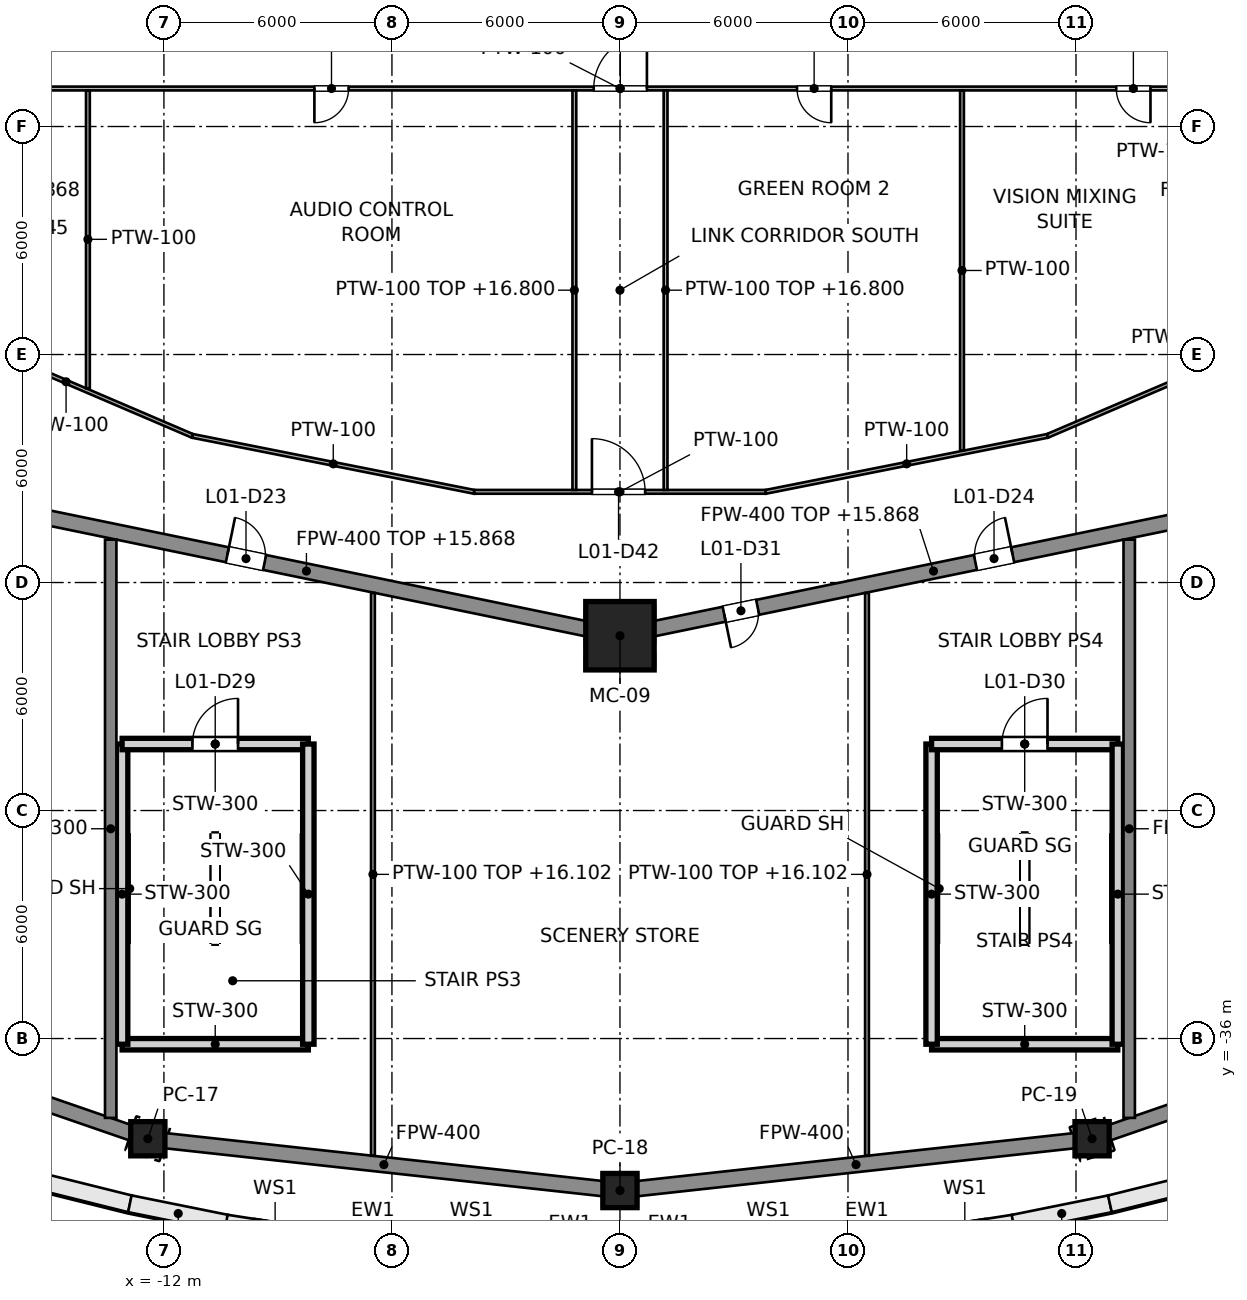
"""IFC4 building model, lengths in metres.
Left out: names, types, materials, properties, quantities, classifications, styles, units other than length and angle.
Written with IfcOpenShell. Run it as: python <this file> out.ifc"""

import sys

from ifc_helpers import new_model, si_unit, direction, frame, frame_2d, origin, origin_2d, place, context, subcontext, project, spatial, polyline, rectangle, hollow_rectangle, outline, extrude, element, fill, save


model = new_model("IFC4")
c1 = context("Model", 3, precision=1e-05, world=origin(), true_north=direction((0.0, 1.0)))
c2 = subcontext(c1, "Body", "Model", "MODEL_VIEW")
j1 = project(units=[si_unit("LENGTHUNIT", "METRE"), si_unit("PLANEANGLEUNIT", "RADIAN")], contexts=[c1])
p1 = place(None, origin())
s1 = spatial("IfcSite", under=j1, at=p1, CompositionType="ELEMENT")
p2 = place(p1, origin())
s2 = spatial("IfcBuilding", under=s1, at=p2, CompositionType="ELEMENT")
p3 = place(p2, frame((0.0, 0.0, 8.0)))
s3 = spatial("IfcBuildingStorey", under=s2, at=p3, CompositionType="ELEMENT", Elevation=8.0)
p4 = place(p3, frame((0.0, -25.4, 0.0), z_axis=(0.0, 0.0, 1.0), x_axis=(0.0, -1.0, 0.0)))
e1 = element("IfcColumn", 1, at=p4, inside=s3, PredefinedType="COLUMN", context=c2, shape_type="SweptSolid", body=[
    extrude(hollow_rectangle(XDim=1.8, YDim=1.8, WallThickness=0.08, at=origin_2d()), origin(), (0.0, 0.0, 1.0), 9.0),
])
for number, where, z_axis, x_axis in (
    (2, (-12.423, -38.637, 0.0), (0.0, 0.0, 1.0), (-0.306, -0.952, 0.0)),
    (3, (0.0, -40.0, 0.0), (0.0, 0.0, 1.0), (0.0, -1.0, 0.0)),
    (4, (12.423, -38.637, 0.0), (0.0, 0.0, 1.0), (0.306, -0.952, 0.0)),
):
    element("IfcColumn", number, at=place(p3, frame(where, z_axis=z_axis, x_axis=x_axis)), inside=s3, PredefinedType="COLUMN", context=c2, shape_type="SweptSolid", body=[
        extrude(hollow_rectangle(XDim=0.9, YDim=0.9, WallThickness=0.04, at=origin_2d()), origin(), (0.0, 0.0, 1.0), 9.0),
    ])
p5 = place(p3, origin())
e5 = element("IfcWall", 5, at=p5, inside=s3, PredefinedType="SOLIDWALL", context=c2, shape_type="SweptSolid", body=[
    extrude(outline(polyline([(-25.0, -36.373), (-22.699, -37.422), (-20.337, -38.369), (-17.918, -39.21), (-15.451, -39.944), (-12.941, -40.569), (-12.842, -40.13), (-15.332, -39.51), (-17.78, -38.782), (-20.179, -37.948), (-22.522, -37.009), (-24.804, -35.968), (-25.0, -36.373)])), origin(), (0.0, 0.0, 1.0), 8.8),
])
p6 = place(p3, frame((-12.896, -40.348, 0.0), z_axis=(0.0, 0.0, 1.0), x_axis=(0.980275735323, -0.197634720473, 0.0)))
e6 = element("IfcWall", 6, at=p6, inside=s3, PredefinedType="SOLIDWALL", context=c2, shape_type="SweptSolid", body=[
    extrude(rectangle(XDim=2.597, YDim=0.45, at=frame_2d((1.298, 0.0))), origin(), (0.0, 0.0, 1.0), 8.8),
])
p7 = place(p3, frame((-10.361, -40.86, 0.0), z_axis=(0.0, 0.0, 1.0), x_axis=(0.98810254681, -0.153796479115, 0.0)))
e7 = element("IfcWall", 7, at=p7, inside=s3, PredefinedType="SOLIDWALL", context=c2, shape_type="SweptSolid", body=[
    extrude(rectangle(XDim=2.605, YDim=0.45, at=frame_2d((1.302, 0.0))), origin(), (0.0, 0.0, 1.0), 8.8),
])
p8 = place(p7, frame((0.702, 0.0, 1.0)))
e8 = element("IfcOpeningElement", 8, at=p8, cuts=e7, PredefinedType="OPENING", context=c2, shape_type="SweptSolid", body=[
    extrude(rectangle(XDim=1.2, YDim=1.8, at=frame_2d((0.6, 0.9))), frame((0.0, 0.225, 0.0), z_axis=(0.0, -1.0, 0.0), x_axis=(1.0, 0.0, 0.0)), (0.0, 0.0, 1.0), 0.45),
])
p9 = place(p3, frame((7.787, -41.26, 0.0), z_axis=(0.0, 0.0, 1.0), x_axis=(0.98810254681, 0.153796479115, 0.0)))
e9 = element("IfcWall", 9, at=p9, inside=s3, PredefinedType="SOLIDWALL", context=c2, shape_type="SweptSolid", body=[
    extrude(rectangle(XDim=2.605, YDim=0.45, at=frame_2d((1.302, 0.0))), origin(), (0.0, 0.0, 1.0), 8.8),
])
p10 = place(p9, frame((0.702, 0.0, 1.0)))
e10 = element("IfcOpeningElement", 10, at=p10, cuts=e9, PredefinedType="OPENING", context=c2, shape_type="SweptSolid", body=[
    extrude(rectangle(XDim=1.2, YDim=1.8, at=frame_2d((0.6, 0.9))), frame((0.0, 0.225, 0.0), z_axis=(0.0, -1.0, 0.0), x_axis=(1.0, 0.0, 0.0)), (0.0, 0.0, 1.0), 0.45),
])
p11 = place(p3, frame((10.351, -40.862, 0.0), z_axis=(0.0, 0.0, 1.0), x_axis=(0.980275735323, 0.197634720473, 0.0)))
e11 = element("IfcWall", 11, at=p11, inside=s3, PredefinedType="SOLIDWALL", context=c2, shape_type="SweptSolid", body=[
    extrude(rectangle(XDim=2.597, YDim=0.45, at=frame_2d((1.298, 0.0))), origin(), (0.0, 0.0, 1.0), 8.8),
])
e12 = element("IfcWall", 12, at=p5, inside=s3, PredefinedType="SOLIDWALL", context=c2, shape_type="SweptSolid", body=[
    extrude(outline(polyline([(12.941, -40.569), (15.451, -39.944), (17.918, -39.21), (20.337, -38.369), (22.699, -37.422), (25.0, -36.373), (24.804, -35.968), (22.522, -37.009), (20.179, -37.948), (17.78, -38.782), (15.332, -39.51), (12.842, -40.13), (12.941, -40.569)])), origin(), (0.0, 0.0, 1.0), 8.8),
])
p12 = place(p3, frame((-8.2, -36.15, 0.0), z_axis=(0.0, 0.0, 1.0), x_axis=(-1.0, 0.0, 0.0)))
e13 = element("IfcWall", 13, at=p12, inside=s3, PredefinedType="SOLIDWALL", context=c2, shape_type="SweptSolid", body=[
    extrude(rectangle(XDim=4.9, YDim=0.3, at=frame_2d((2.45, 0.0))), origin(), (0.0, 0.0, 1.0), 8.8),
])
p13 = place(p3, frame((-13.1, -36.15, 0.0), z_axis=(0.0, 0.0, 1.0), x_axis=(0.0, 1.0, 0.0)))
e14 = element("IfcWall", 14, at=p13, inside=s3, PredefinedType="SOLIDWALL", context=c2, shape_type="SweptSolid", body=[
    extrude(rectangle(XDim=7.9, YDim=0.3, at=frame_2d((3.95, 0.0))), origin(), (0.0, 0.0, 1.0), 8.8),
])
p14 = place(p3, frame((-13.1, -28.25, 0.0), z_axis=(0.0, 0.0, 1.0), x_axis=(1.0, 0.0, 0.0)))
e15 = element("IfcWall", 15, at=p14, inside=s3, PredefinedType="SOLIDWALL", context=c2, shape_type="SweptSolid", body=[
    extrude(rectangle(XDim=4.9, YDim=0.3, at=frame_2d((2.45, 0.0))), origin(), (0.0, 0.0, 1.0), 8.8),
])
p15 = place(p14, frame((1.85, 0.0, 0.0)))
e16 = element("IfcOpeningElement", 16, at=p15, cuts=e15, PredefinedType="OPENING", context=c2, shape_type="SweptSolid", body=[
    extrude(rectangle(XDim=1.2, YDim=2.1, at=frame_2d((0.6, 1.05))), frame((0.0, 0.15, 0.0), z_axis=(0.0, -1.0, 0.0), x_axis=(1.0, 0.0, 0.0)), (0.0, 0.0, 1.0), 0.3),
])
p16 = place(p3, frame((-8.2, -28.25, 0.0), z_axis=(0.0, 0.0, 1.0), x_axis=(0.0, -1.0, 0.0)))
e17 = element("IfcWall", 17, at=p16, inside=s3, PredefinedType="SOLIDWALL", context=c2, shape_type="SweptSolid", body=[
    extrude(rectangle(XDim=7.9, YDim=0.3, at=frame_2d((3.95, 0.0))), origin(), (0.0, 0.0, 1.0), 8.8),
])
p17 = place(p3, frame((13.1, -36.15, 0.0), z_axis=(0.0, 0.0, 1.0), x_axis=(-1.0, 0.0, 0.0)))
e18 = element("IfcWall", 18, at=p17, inside=s3, PredefinedType="SOLIDWALL", context=c2, shape_type="SweptSolid", body=[
    extrude(rectangle(XDim=4.9, YDim=0.3, at=frame_2d((2.45, 0.0))), origin(), (0.0, 0.0, 1.0), 8.8),
])
p18 = place(p3, frame((8.2, -36.15, 0.0), z_axis=(0.0, 0.0, 1.0), x_axis=(0.0, 1.0, 0.0)))
e19 = element("IfcWall", 19, at=p18, inside=s3, PredefinedType="SOLIDWALL", context=c2, shape_type="SweptSolid", body=[
    extrude(rectangle(XDim=7.9, YDim=0.3, at=frame_2d((3.95, 0.0))), origin(), (0.0, 0.0, 1.0), 8.8),
])
p19 = place(p3, frame((8.2, -28.25, 0.0), z_axis=(0.0, 0.0, 1.0), x_axis=(1.0, 0.0, 0.0)))
e20 = element("IfcWall", 20, at=p19, inside=s3, PredefinedType="SOLIDWALL", context=c2, shape_type="SweptSolid", body=[
    extrude(rectangle(XDim=4.9, YDim=0.3, at=frame_2d((2.45, 0.0))), origin(), (0.0, 0.0, 1.0), 8.8),
])
p20 = place(p19, frame((1.85, 0.0, 0.0)))
e21 = element("IfcOpeningElement", 21, at=p20, cuts=e20, PredefinedType="OPENING", context=c2, shape_type="SweptSolid", body=[
    extrude(rectangle(XDim=1.2, YDim=2.1, at=frame_2d((0.6, 1.05))), frame((0.0, 0.15, 0.0), z_axis=(0.0, -1.0, 0.0), x_axis=(1.0, 0.0, 0.0)), (0.0, 0.0, 1.0), 0.3),
])
p21 = place(p3, frame((13.1, -28.25, 0.0), z_axis=(0.0, 0.0, 1.0), x_axis=(0.0, -1.0, 0.0)))
e22 = element("IfcWall", 22, at=p21, inside=s3, PredefinedType="SOLIDWALL", context=c2, shape_type="SweptSolid", body=[
    extrude(rectangle(XDim=7.9, YDim=0.3, at=frame_2d((3.95, 0.0))), origin(), (0.0, 0.0, 1.0), 8.8),
])
p22 = place(p3, frame((-24.0, -34.641, 0.0), z_axis=(0.0, 0.0, 1.0), x_axis=(0.94527485301, -0.326275117449, 0.0)))
e23 = element("IfcWall", 23, at=p22, inside=s3, PredefinedType="PARTITIONING", context=c2, shape_type="SweptSolid", body=[
    extrude(rectangle(XDim=12.247, YDim=0.4, at=frame_2d((6.124, 0.0))), origin(), (0.0, 0.0, 1.0), 7.877),
])
for number, where, z_axis, x_axis in (
    (24, (-12.423, -38.637, 0.0), (0.0, 0.0, 1.0), (0.994, -0.109, 0.0)),
    (25, (0.0, -40.0, 0.0), (0.0, 0.0, 1.0), (0.994, 0.109, 0.0)),
):
    element("IfcWall", number, at=place(p3, frame(where, z_axis=z_axis, x_axis=x_axis)), inside=s3, PredefinedType="PARTITIONING", context=c2, shape_type="SweptSolid", body=[
        extrude(rectangle(XDim=12.498, YDim=0.4, at=frame_2d((6.249, 0.0))), origin(), (0.0, 0.0, 1.0), 7.877),
    ])
p23 = place(p3, frame((12.423, -38.637, 0.0), z_axis=(0.0, 0.0, 1.0), x_axis=(0.94527485301, 0.326275117449, 0.0)))
e26 = element("IfcWall", 26, at=p23, inside=s3, PredefinedType="PARTITIONING", context=c2, shape_type="SweptSolid", body=[
    extrude(rectangle(XDim=12.247, YDim=0.4, at=frame_2d((6.124, 0.0))), origin(), (0.0, 0.0, 1.0), 7.877),
])
p24 = place(p3, frame((-16.5, -21.997, 0.0), z_axis=(0.0, 0.0, 1.0), x_axis=(0.979389305257, -0.201981654484, 0.0)))
e27 = element("IfcWall", 27, at=p24, inside=s3, PredefinedType="PARTITIONING", context=c2, shape_type="SweptSolid", body=[
    extrude(rectangle(XDim=16.847, YDim=0.4, at=frame_2d((8.424, 0.0))), origin(), (0.0, 0.0, 1.0), 7.868),
])
p25 = place(p24, frame((6.3, 0.0, 0.0)))
e28 = element("IfcOpeningElement", 28, at=p25, cuts=e27, PredefinedType="OPENING", context=c2, shape_type="SweptSolid", body=[
    extrude(rectangle(XDim=1.0, YDim=2.1, at=frame_2d((0.5, 1.05))), frame((0.0, 0.2, 0.0), z_axis=(0.0, -1.0, 0.0), x_axis=(1.0, 0.0, 0.0)), (0.0, 0.0, 1.0), 0.4),
])
p26 = place(p3, frame((0.0, -25.4, 0.0), z_axis=(0.0, 0.0, 1.0), x_axis=(0.979389305257, 0.201981654484, 0.0)))
e29 = element("IfcWall", 29, at=p26, inside=s3, PredefinedType="PARTITIONING", context=c2, shape_type="SweptSolid", body=[
    extrude(rectangle(XDim=16.847, YDim=0.4, at=frame_2d((8.424, 0.0))), origin(), (0.0, 0.0, 1.0), 7.868),
])
p27 = place(p26, frame((9.55, 0.0, 0.0)))
e30 = element("IfcOpeningElement", 30, at=p27, cuts=e29, PredefinedType="OPENING", context=c2, shape_type="SweptSolid", body=[
    extrude(rectangle(XDim=1.0, YDim=2.1, at=frame_2d((0.5, 1.05))), frame((0.0, 0.2, 0.0), z_axis=(0.0, -1.0, 0.0), x_axis=(1.0, 0.0, 0.0)), (0.0, 0.0, 1.0), 0.4),
])
p28 = place(p26, frame((2.8, 0.0, 0.0)))
e31 = element("IfcOpeningElement", 31, at=p28, cuts=e29, PredefinedType="OPENING", context=c2, shape_type="SweptSolid", body=[
    extrude(rectangle(XDim=0.9, YDim=2.1, at=frame_2d((0.45, 1.05))), frame((0.0, 0.2, 0.0), z_axis=(0.0, -1.0, 0.0), x_axis=(1.0, 0.0, 0.0)), (0.0, 0.0, 1.0), 0.4),
])
p29 = place(p3, frame((-17.898, -17.295, 0.0), z_axis=(0.0, 0.0, 1.0), x_axis=(0.919302147288, -0.3935524895, 0.0)))
e32 = element("IfcWall", 32, at=p29, inside=s3, PredefinedType="PARTITIONING", context=c2, shape_type="SweptSolid", body=[
    extrude(rectangle(XDim=7.23, YDim=0.1, at=frame_2d((3.615, 0.0))), origin(), (0.0, 0.0, 1.0), 7.877),
])
p30 = place(p3, frame((-11.251, -20.141, 0.0), z_axis=(0.0, 0.0, 1.0), x_axis=(0.980829586671, -0.194867447026, 0.0)))
e33 = element("IfcWall", 33, at=p30, inside=s3, PredefinedType="PARTITIONING", context=c2, shape_type="SweptSolid", body=[
    extrude(rectangle(XDim=7.559, YDim=0.1, at=frame_2d((3.779, 0.0))), origin(), (0.0, 0.0, 1.0), 7.877),
])
p31 = place(p3, frame((-3.837, -21.614, 0.0), z_axis=(0.0, 0.0, 1.0), x_axis=(1.0, 0.0, 0.0)))
e34 = element("IfcWall", 34, at=p31, inside=s3, PredefinedType="PARTITIONING", context=c2, shape_type="SweptSolid", body=[
    extrude(rectangle(XDim=7.675, YDim=0.1, at=frame_2d((3.837, 0.0))), origin(), (0.0, 0.0, 1.0), 7.877),
])
p32 = place(p31, frame((3.1, 0.0, 0.0)))
e35 = element("IfcOpeningElement", 35, at=p32, cuts=e34, PredefinedType="OPENING", context=c2, shape_type="SweptSolid", body=[
    extrude(rectangle(XDim=1.4, YDim=2.1, at=frame_2d((0.7, 1.05))), frame((0.0, 0.05, 0.0), z_axis=(0.0, -1.0, 0.0), x_axis=(1.0, 0.0, 0.0)), (0.0, 0.0, 1.0), 0.1),
])
p33 = place(p3, frame((3.837, -21.614, 0.0), z_axis=(0.0, 0.0, 1.0), x_axis=(0.980829586671, 0.194867447026, 0.0)))
e36 = element("IfcWall", 36, at=p33, inside=s3, PredefinedType="PARTITIONING", context=c2, shape_type="SweptSolid", body=[
    extrude(rectangle(XDim=7.559, YDim=0.1, at=frame_2d((3.779, 0.0))), origin(), (0.0, 0.0, 1.0), 7.877),
])
p34 = place(p3, frame((11.251, -20.141, 0.0), z_axis=(0.0, 0.0, 1.0), x_axis=(0.919302147288, 0.3935524895, 0.0)))
e37 = element("IfcWall", 37, at=p34, inside=s3, PredefinedType="PARTITIONING", context=c2, shape_type="SweptSolid", body=[
    extrude(rectangle(XDim=7.23, YDim=0.1, at=frame_2d((3.615, 0.0))), origin(), (0.0, 0.0, 1.0), 7.877),
])
p35 = place(p3, frame((-24.99, -11.0, 0.0), z_axis=(0.0, 0.0, 1.0), x_axis=(1.0, 0.0, 0.0)))
e38 = element("IfcWall", 38, at=p35, inside=s3, PredefinedType="PARTITIONING", context=c2, shape_type="SweptSolid", body=[
    extrude(rectangle(XDim=49.981, YDim=0.1, at=frame_2d((24.99, 0.0))), origin(), (0.0, 0.0, 1.0), 7.877),
])
p36 = place(p35, frame((8.55, 0.0, 0.0)))
e39 = element("IfcOpeningElement", 39, at=p36, cuts=e38, PredefinedType="OPENING", context=c2, shape_type="SweptSolid", body=[
    extrude(rectangle(XDim=0.9, YDim=2.1, at=frame_2d((0.45, 1.05))), frame((0.0, 0.05, 0.0), z_axis=(0.0, -1.0, 0.0), x_axis=(1.0, 0.0, 0.0)), (0.0, 0.0, 1.0), 0.1),
])
p37 = place(p35, frame((16.95, 0.0, 0.0)))
e40 = element("IfcOpeningElement", 40, at=p37, cuts=e38, PredefinedType="OPENING", context=c2, shape_type="SweptSolid", body=[
    extrude(rectangle(XDim=0.9, YDim=2.1, at=frame_2d((0.45, 1.05))), frame((0.0, 0.05, 0.0), z_axis=(0.0, -1.0, 0.0), x_axis=(1.0, 0.0, 0.0)), (0.0, 0.0, 1.0), 0.1),
])
p38 = place(p35, frame((24.3, 0.0, 0.0)))
e41 = element("IfcOpeningElement", 41, at=p38, cuts=e38, PredefinedType="OPENING", context=c2, shape_type="SweptSolid", body=[
    extrude(rectangle(XDim=1.4, YDim=2.1, at=frame_2d((0.7, 1.05))), frame((0.0, 0.05, 0.0), z_axis=(0.0, -1.0, 0.0), x_axis=(1.0, 0.0, 0.0)), (0.0, 0.0, 1.0), 0.1),
])
p39 = place(p35, frame((29.65, 0.0, 0.0)))
e42 = element("IfcOpeningElement", 42, at=p39, cuts=e38, PredefinedType="OPENING", context=c2, shape_type="SweptSolid", body=[
    extrude(rectangle(XDim=0.9, YDim=2.1, at=frame_2d((0.45, 1.05))), frame((0.0, 0.05, 0.0), z_axis=(0.0, -1.0, 0.0), x_axis=(1.0, 0.0, 0.0)), (0.0, 0.0, 1.0), 0.1),
])
p40 = place(p35, frame((38.05, 0.0, 0.0)))
e43 = element("IfcOpeningElement", 43, at=p40, cuts=e38, PredefinedType="OPENING", context=c2, shape_type="SweptSolid", body=[
    extrude(rectangle(XDim=0.9, YDim=2.1, at=frame_2d((0.45, 1.05))), frame((0.0, 0.05, 0.0), z_axis=(0.0, -1.0, 0.0), x_axis=(1.0, 0.0, 0.0)), (0.0, 0.0, 1.0), 0.1),
])
p41 = place(p3, frame((-14.0, -11.05, 0.0), z_axis=(0.0, 0.0, 1.0), x_axis=(0.0, -1.0, 0.0)))
e44 = element("IfcWall", 44, at=p41, inside=s3, PredefinedType="PARTITIONING", context=c2, shape_type="SweptSolid", body=[
    extrude(rectangle(XDim=7.838, YDim=0.1, at=frame_2d((3.919, 0.0))), origin(), (0.0, 0.0, 1.0), 7.877),
])
for number, where, z_axis, x_axis in (
    (45, (-1.2, -11.05, 0.0), (0.0, 0.0, 1.0), (0.0, -1.0, 0.0)),
    (46, (1.2, -11.05, 0.0), (0.0, 0.0, 1.0), (0.0, -1.0, 0.0)),
):
    element("IfcWall", number, at=place(p3, frame(where, z_axis=z_axis, x_axis=x_axis)), inside=s3, PredefinedType="PARTITIONING", context=c2, shape_type="SweptSolid", body=[
        extrude(rectangle(XDim=10.513, YDim=0.1, at=frame_2d((5.257, 0.0))), origin(), (0.0, 0.0, 1.0), 8.8),
    ])
p42 = place(p3, frame((9.0, -11.05, 0.0), z_axis=(0.0, 0.0, 1.0), x_axis=(0.0, -1.0, 0.0)))
e47 = element("IfcWall", 47, at=p42, inside=s3, PredefinedType="PARTITIONING", context=c2, shape_type="SweptSolid", body=[
    extrude(rectangle(XDim=9.477, YDim=0.1, at=frame_2d((4.738, 0.0))), origin(), (0.0, 0.0, 1.0), 7.877),
])
for number, where, z_axis, x_axis in (
    (48, (13.4, -22.872, 0.0), (0.0, 0.0, 1.0), (0.0, -1.0, 0.0)),
    (49, (-13.4, -22.872, 0.0), (0.0, 0.0, 1.0), (0.0, -1.0, 0.0)),
):
    element("IfcWall", number, at=place(p3, frame(where, z_axis=z_axis, x_axis=x_axis)), inside=s3, PredefinedType="PARTITIONING", context=c2, shape_type="SweptSolid", body=[
        extrude(rectangle(XDim=15.217, YDim=0.3, at=frame_2d((7.608, 0.0))), origin(), (0.0, 0.0, 1.0), 8.026),
    ])
for number, where, z_axis, x_axis in (
    (50, (6.5, -24.274, 0.0), (0.0, 0.0, 1.0), (0.0, -1.0, 0.0)),
    (51, (-6.5, -24.274, 0.0), (0.0, 0.0, 1.0), (0.0, -1.0, 0.0)),
):
    element("IfcWall", number, at=place(p3, frame(where, z_axis=z_axis, x_axis=x_axis)), inside=s3, PredefinedType="PARTITIONING", context=c2, shape_type="SweptSolid", body=[
        extrude(rectangle(XDim=14.812, YDim=0.1, at=frame_2d((7.406, 0.0))), origin(), (0.0, 0.0, 1.0), 8.102),
    ])
p43 = place(p25, origin())
e52 = element("IfcDoor", 52, at=p43, inside=s3, OperationType="SINGLE_SWING_LEFT", PredefinedType="DOOR", context=c2, shape_type="SweptSolid", body=[
    extrude(rectangle(XDim=1.0, YDim=2.1, at=frame_2d((0.5, 1.05))), frame((0.0, 0.025, 0.0), z_axis=(0.0, -1.0, 0.0), x_axis=(1.0, 0.0, 0.0)), (0.0, 0.0, 1.0), 0.05),
])
fill(e28, e52)
p44 = place(p27, origin())
e53 = element("IfcDoor", 53, at=p44, inside=s3, OperationType="SINGLE_SWING_RIGHT", PredefinedType="DOOR", context=c2, shape_type="SweptSolid", body=[
    extrude(rectangle(XDim=1.0, YDim=2.1, at=frame_2d((0.5, 1.05))), frame((0.0, 0.025, 0.0), z_axis=(0.0, -1.0, 0.0), x_axis=(1.0, 0.0, 0.0)), (0.0, 0.0, 1.0), 0.05),
])
fill(e30, e53)
p45 = place(p15, origin())
e54 = element("IfcDoor", 54, at=p45, inside=s3, OperationType="SINGLE_SWING_RIGHT", PredefinedType="DOOR", context=c2, shape_type="SweptSolid", body=[
    extrude(rectangle(XDim=1.2, YDim=2.1, at=frame_2d((0.6, 1.05))), frame((0.0, 0.025, 0.0), z_axis=(0.0, -1.0, 0.0), x_axis=(1.0, 0.0, 0.0)), (0.0, 0.0, 1.0), 0.05),
])
fill(e16, e54)
p46 = place(p20, origin())
e55 = element("IfcDoor", 55, at=p46, inside=s3, OperationType="SINGLE_SWING_RIGHT", PredefinedType="DOOR", context=c2, shape_type="SweptSolid", body=[
    extrude(rectangle(XDim=1.2, YDim=2.1, at=frame_2d((0.6, 1.05))), frame((0.0, 0.025, 0.0), z_axis=(0.0, -1.0, 0.0), x_axis=(1.0, 0.0, 0.0)), (0.0, 0.0, 1.0), 0.05),
])
fill(e21, e55)
p47 = place(p28, origin())
e56 = element("IfcDoor", 56, at=p47, inside=s3, OperationType="SINGLE_SWING_LEFT", PredefinedType="DOOR", context=c2, shape_type="SweptSolid", body=[
    extrude(rectangle(XDim=0.9, YDim=2.1, at=frame_2d((0.45, 1.05))), frame((0.0, 0.025, 0.0), z_axis=(0.0, -1.0, 0.0), x_axis=(1.0, 0.0, 0.0)), (0.0, 0.0, 1.0), 0.05),
])
fill(e31, e56)
p48 = place(p37, origin())
e57 = element("IfcDoor", 57, at=p48, inside=s3, OperationType="SINGLE_SWING_LEFT", PredefinedType="DOOR", context=c2, shape_type="SweptSolid", body=[
    extrude(rectangle(XDim=0.9, YDim=2.1, at=frame_2d((0.45, 1.05))), frame((0.0, 0.025, 0.0), z_axis=(0.0, -1.0, 0.0), x_axis=(1.0, 0.0, 0.0)), (0.0, 0.0, 1.0), 0.05),
])
fill(e40, e57)
p49 = place(p38, origin())
e58 = element("IfcDoor", 58, at=p49, inside=s3, OperationType="SINGLE_SWING_RIGHT", PredefinedType="DOOR", context=c2, shape_type="SweptSolid", body=[
    extrude(rectangle(XDim=1.4, YDim=2.1, at=frame_2d((0.7, 1.05))), frame((0.0, 0.025, 0.0), z_axis=(0.0, -1.0, 0.0), x_axis=(1.0, 0.0, 0.0)), (0.0, 0.0, 1.0), 0.05),
])
fill(e41, e58)
p50 = place(p32, origin())
e59 = element("IfcDoor", 59, at=p50, inside=s3, OperationType="SINGLE_SWING_LEFT", PredefinedType="DOOR", context=c2, shape_type="SweptSolid", body=[
    extrude(rectangle(XDim=1.4, YDim=2.1, at=frame_2d((0.7, 1.05))), frame((0.0, 0.025, 0.0), z_axis=(0.0, -1.0, 0.0), x_axis=(1.0, 0.0, 0.0)), (0.0, 0.0, 1.0), 0.05),
])
fill(e35, e59)
p51 = place(p39, origin())
e60 = element("IfcDoor", 60, at=p51, inside=s3, OperationType="SINGLE_SWING_RIGHT", PredefinedType="DOOR", context=c2, shape_type="SweptSolid", body=[
    extrude(rectangle(XDim=0.9, YDim=2.1, at=frame_2d((0.45, 1.05))), frame((0.0, 0.025, 0.0), z_axis=(0.0, -1.0, 0.0), x_axis=(1.0, 0.0, 0.0)), (0.0, 0.0, 1.0), 0.05),
])
fill(e42, e60)
p52 = place(p40, origin())
e61 = element("IfcDoor", 61, at=p52, inside=s3, OperationType="SINGLE_SWING_RIGHT", PredefinedType="DOOR", context=c2, shape_type="SweptSolid", body=[
    extrude(rectangle(XDim=0.9, YDim=2.1, at=frame_2d((0.45, 1.05))), frame((0.0, 0.025, 0.0), z_axis=(0.0, -1.0, 0.0), x_axis=(1.0, 0.0, 0.0)), (0.0, 0.0, 1.0), 0.05),
])
fill(e43, e61)
save(model, sys.argv[1])
